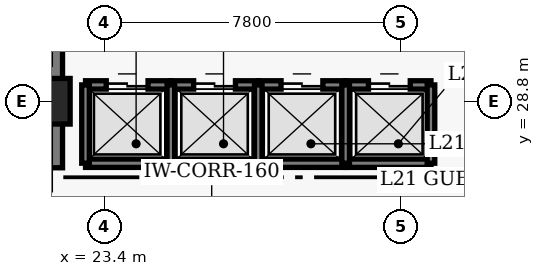
"""IFC4 building model, lengths in metres.
Left out: names, types, materials, properties, quantities, classifications, styles, units other than length and angle.
Written with IfcOpenShell. Run it as: python <this file> out.ifc"""

import sys

from ifc_helpers import new_model, si_unit, direction, frame, frame_2d, origin, origin_2d, place, context, subcontext, project, spatial, rectangle, extrude, element, fill, save


model = new_model("IFC4")
c1 = context("Model", 3, precision=1e-05, world=origin(), true_north=direction((0.0, 1.0)))
c2 = subcontext(c1, "Body", "Model", "MODEL_VIEW")
j1 = project(units=[si_unit("LENGTHUNIT", "METRE"), si_unit("PLANEANGLEUNIT", "RADIAN")], contexts=[c1])
p1 = place(None, origin())
s1 = spatial("IfcSite", under=j1, at=p1, CompositionType="ELEMENT")
p2 = place(p1, origin())
s2 = spatial("IfcBuilding", under=s1, at=p2, CompositionType="ELEMENT")
p3 = place(p2, frame((0.0, 0.0, 88.0)))
s3 = spatial("IfcBuildingStorey", under=s2, at=p3, CompositionType="ELEMENT", Elevation=88.0)
p4 = place(p3, frame((21.9, 27.05, 0.0), z_axis=(0.0, 0.0, 1.0), x_axis=(0.0, 1.0, 0.0)))
e1 = element("IfcWall", 1, at=p4, inside=s3, PredefinedType="SHEAR", context=c2, shape_type="SweptSolid", body=[
    extrude(rectangle(XDim=13.67, YDim=0.8, at=frame_2d((6.835, 0.0))), origin(), (0.0, 0.0, 1.0), 3.8),
])
p5 = place(p3, frame((21.9, 28.8, 0.0), z_axis=(0.0, 0.0, 1.0), x_axis=(1.0, 0.0, 0.0)))
e2 = element("IfcColumn", 2, at=p5, inside=s3, PredefinedType="COLUMN", context=c2, shape_type="SweptSolid", body=[
    extrude(rectangle(XDim=1.2, YDim=1.2, at=origin_2d()), origin(), (0.0, 0.0, 1.0), 3.8),
])
p6 = place(p3, frame((22.905, 29.23, 0.0), z_axis=(0.0, 0.0, 1.0), x_axis=(1.0, 0.0, 0.0)))
e3 = element("IfcWall", 3, at=p6, inside=s3, PredefinedType="SHEAR", context=c2, shape_type="SweptSolid", body=[
    extrude(rectangle(XDim=2.245, YDim=0.22, at=frame_2d((1.123, 0.0))), origin(), (0.0, 0.0, 1.0), 3.8),
])
p7 = place(p6, frame((0.545, 0.0, 0.0)))
e4 = element("IfcOpeningElement", 4, at=p7, cuts=e3, PredefinedType="OPENING", context=c2, shape_type="SweptSolid", body=[
    extrude(rectangle(XDim=1.1, YDim=2.15, at=frame_2d((0.55, 1.075))), frame((0.0, 0.12, 0.0), z_axis=(0.0, -1.0, 0.0), x_axis=(1.0, 0.0, 0.0)), (0.0, 0.0, 1.0), 0.24),
])
p8 = place(p3, frame((22.905, 27.17, 0.0), z_axis=(0.0, 0.0, 1.0), x_axis=(1.0, 0.0, 0.0)))
e5 = element("IfcWall", 5, at=p8, inside=s3, PredefinedType="SHEAR", context=c2, shape_type="SweptSolid", body=[
    extrude(rectangle(XDim=2.245, YDim=0.22, at=frame_2d((1.123, 0.0))), origin(), (0.0, 0.0, 1.0), 3.8),
])
p9 = place(p3, frame((22.905, 27.17, 0.0), z_axis=(0.0, 0.0, 1.0), x_axis=(0.0, 1.0, 0.0)))
e6 = element("IfcWall", 6, at=p9, inside=s3, PredefinedType="SHEAR", context=c2, shape_type="SweptSolid", body=[
    extrude(rectangle(XDim=2.06, YDim=0.2, at=frame_2d((1.03, 0.0))), origin(), (0.0, 0.0, 1.0), 3.8),
])
p10 = place(p3, frame((25.15, 29.23, 0.0), z_axis=(0.0, 0.0, 1.0), x_axis=(1.0, 0.0, 0.0)))
e7 = element("IfcWall", 7, at=p10, inside=s3, PredefinedType="SHEAR", context=c2, shape_type="SweptSolid", body=[
    extrude(rectangle(XDim=2.3, YDim=0.22, at=frame_2d((1.15, 0.0))), origin(), (0.0, 0.0, 1.0), 3.8),
])
p11 = place(p10, frame((0.6, 0.0, 0.0)))
e8 = element("IfcOpeningElement", 8, at=p11, cuts=e7, PredefinedType="OPENING", context=c2, shape_type="SweptSolid", body=[
    extrude(rectangle(XDim=1.1, YDim=2.15, at=frame_2d((0.55, 1.075))), frame((0.0, 0.12, 0.0), z_axis=(0.0, -1.0, 0.0), x_axis=(1.0, 0.0, 0.0)), (0.0, 0.0, 1.0), 0.24),
])
p12 = place(p3, frame((25.15, 27.17, 0.0), z_axis=(0.0, 0.0, 1.0), x_axis=(1.0, 0.0, 0.0)))
e9 = element("IfcWall", 9, at=p12, inside=s3, PredefinedType="SHEAR", context=c2, shape_type="SweptSolid", body=[
    extrude(rectangle(XDim=2.3, YDim=0.22, at=frame_2d((1.15, 0.0))), origin(), (0.0, 0.0, 1.0), 3.8),
])
p13 = place(p3, frame((25.15, 27.17, 0.0), z_axis=(0.0, 0.0, 1.0), x_axis=(0.0, 1.0, 0.0)))
e10 = element("IfcWall", 10, at=p13, inside=s3, PredefinedType="SHEAR", context=c2, shape_type="SweptSolid", body=[
    extrude(rectangle(XDim=2.06, YDim=0.2, at=frame_2d((1.03, 0.0))), origin(), (0.0, 0.0, 1.0), 3.8),
])
p14 = place(p3, frame((27.45, 29.23, 0.0), z_axis=(0.0, 0.0, 1.0), x_axis=(1.0, 0.0, 0.0)))
e11 = element("IfcWall", 11, at=p14, inside=s3, PredefinedType="SHEAR", context=c2, shape_type="SweptSolid", body=[
    extrude(rectangle(XDim=2.3, YDim=0.22, at=frame_2d((1.15, 0.0))), origin(), (0.0, 0.0, 1.0), 3.8),
])
p15 = place(p14, frame((0.6, 0.0, 0.0)))
e12 = element("IfcOpeningElement", 12, at=p15, cuts=e11, PredefinedType="OPENING", context=c2, shape_type="SweptSolid", body=[
    extrude(rectangle(XDim=1.1, YDim=2.15, at=frame_2d((0.55, 1.075))), frame((0.0, 0.12, 0.0), z_axis=(0.0, -1.0, 0.0), x_axis=(1.0, 0.0, 0.0)), (0.0, 0.0, 1.0), 0.24),
])
p16 = place(p3, frame((27.45, 27.17, 0.0), z_axis=(0.0, 0.0, 1.0), x_axis=(1.0, 0.0, 0.0)))
e13 = element("IfcWall", 13, at=p16, inside=s3, PredefinedType="SHEAR", context=c2, shape_type="SweptSolid", body=[
    extrude(rectangle(XDim=2.3, YDim=0.22, at=frame_2d((1.15, 0.0))), origin(), (0.0, 0.0, 1.0), 3.8),
])
p17 = place(p3, frame((27.45, 27.17, 0.0), z_axis=(0.0, 0.0, 1.0), x_axis=(0.0, 1.0, 0.0)))
e14 = element("IfcWall", 14, at=p17, inside=s3, PredefinedType="SHEAR", context=c2, shape_type="SweptSolid", body=[
    extrude(rectangle(XDim=2.06, YDim=0.2, at=frame_2d((1.03, 0.0))), origin(), (0.0, 0.0, 1.0), 3.8),
])
p18 = place(p3, frame((29.75, 29.23, 0.0), z_axis=(0.0, 0.0, 1.0), x_axis=(1.0, 0.0, 0.0)))
e15 = element("IfcWall", 15, at=p18, inside=s3, PredefinedType="SHEAR", context=c2, shape_type="SweptSolid", body=[
    extrude(rectangle(XDim=2.245, YDim=0.22, at=frame_2d((1.123, 0.0))), origin(), (0.0, 0.0, 1.0), 3.8),
])
p19 = place(p18, frame((0.6, 0.0, 0.0)))
e16 = element("IfcOpeningElement", 16, at=p19, cuts=e15, PredefinedType="OPENING", context=c2, shape_type="SweptSolid", body=[
    extrude(rectangle(XDim=1.1, YDim=2.15, at=frame_2d((0.55, 1.075))), frame((0.0, 0.12, 0.0), z_axis=(0.0, -1.0, 0.0), x_axis=(1.0, 0.0, 0.0)), (0.0, 0.0, 1.0), 0.24),
])
p20 = place(p3, frame((29.75, 27.17, 0.0), z_axis=(0.0, 0.0, 1.0), x_axis=(1.0, 0.0, 0.0)))
e17 = element("IfcWall", 17, at=p20, inside=s3, PredefinedType="SHEAR", context=c2, shape_type="SweptSolid", body=[
    extrude(rectangle(XDim=2.245, YDim=0.22, at=frame_2d((1.123, 0.0))), origin(), (0.0, 0.0, 1.0), 3.8),
])
for number, where, z_axis, x_axis in (
    (18, (29.75, 27.17, 0.0), (0.0, 0.0, 1.0), (0.0, 1.0, 0.0)),
    (19, (31.995, 27.17, 0.0), (0.0, 0.0, 1.0), (0.0, 1.0, 0.0)),
):
    element("IfcWall", number, at=place(p3, frame(where, z_axis=z_axis, x_axis=x_axis)), inside=s3, PredefinedType="SHEAR", context=c2, shape_type="SweptSolid", body=[
        extrude(rectangle(XDim=2.06, YDim=0.2, at=frame_2d((1.03, 0.0))), origin(), (0.0, 0.0, 1.0), 3.8),
    ])
p21 = place(p7, origin())
e20 = element("IfcDoor", 20, at=p21, inside=s3, OperationType="DOUBLE_DOOR_SLIDING", PredefinedType="DOOR", context=c2, shape_type="SweptSolid", body=[
    extrude(rectangle(XDim=1.1, YDim=2.15, at=frame_2d((0.55, 1.075))), frame((0.0, 0.025, 0.0), z_axis=(0.0, -1.0, 0.0), x_axis=(1.0, 0.0, 0.0)), (0.0, 0.0, 1.0), 0.05),
])
fill(e4, e20)
p22 = place(p11, origin())
e21 = element("IfcDoor", 21, at=p22, inside=s3, OperationType="DOUBLE_DOOR_SLIDING", PredefinedType="DOOR", context=c2, shape_type="SweptSolid", body=[
    extrude(rectangle(XDim=1.1, YDim=2.15, at=frame_2d((0.55, 1.075))), frame((0.0, 0.025, 0.0), z_axis=(0.0, -1.0, 0.0), x_axis=(1.0, 0.0, 0.0)), (0.0, 0.0, 1.0), 0.05),
])
fill(e8, e21)
p23 = place(p15, origin())
e22 = element("IfcDoor", 22, at=p23, inside=s3, OperationType="DOUBLE_DOOR_SLIDING", PredefinedType="DOOR", context=c2, shape_type="SweptSolid", body=[
    extrude(rectangle(XDim=1.1, YDim=2.15, at=frame_2d((0.55, 1.075))), frame((0.0, 0.025, 0.0), z_axis=(0.0, -1.0, 0.0), x_axis=(1.0, 0.0, 0.0)), (0.0, 0.0, 1.0), 0.05),
])
fill(e12, e22)
p24 = place(p19, origin())
e23 = element("IfcDoor", 23, at=p24, inside=s3, OperationType="DOUBLE_DOOR_SLIDING", PredefinedType="DOOR", context=c2, shape_type="SweptSolid", body=[
    extrude(rectangle(XDim=1.1, YDim=2.15, at=frame_2d((0.55, 1.075))), frame((0.0, 0.025, 0.0), z_axis=(0.0, -1.0, 0.0), x_axis=(1.0, 0.0, 0.0)), (0.0, 0.0, 1.0), 0.05),
])
fill(e16, e23)
save(model, sys.argv[1])
